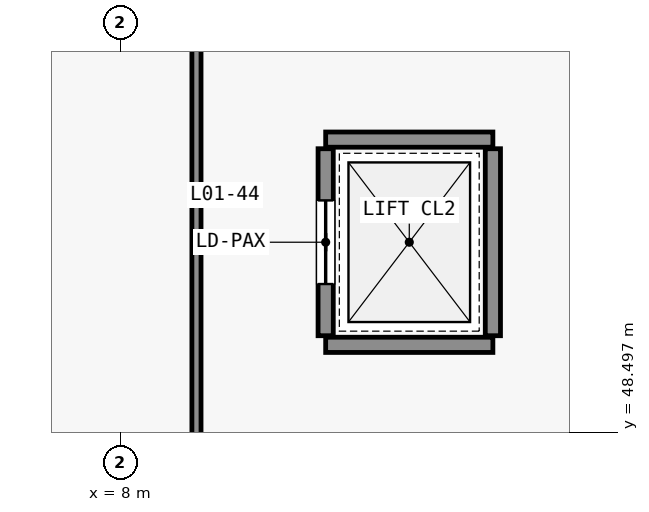
"""IFC4 building model, lengths in metres.
Left out: names, types, materials, properties, quantities, classifications, styles, units other than length and angle.
Written with IfcOpenShell. Run it as: python <this file> out.ifc"""

import sys

from ifc_helpers import new_model, si_unit, direction, frame, frame_2d, origin, place, context, subcontext, project, spatial, rectangle, extrude, element, fill, save


model = new_model("IFC4")
c1 = context("Model", 3, precision=1e-05, world=origin(), true_north=direction((0.0, 1.0)))
c2 = subcontext(c1, "Body", "Model", "MODEL_VIEW")
j1 = project(units=[si_unit("LENGTHUNIT", "METRE"), si_unit("PLANEANGLEUNIT", "RADIAN")], contexts=[c1])
p1 = place(None, origin())
s1 = spatial("IfcSite", under=j1, at=p1, CompositionType="ELEMENT")
p2 = place(p1, origin())
s2 = spatial("IfcBuilding", under=s1, at=p2, CompositionType="ELEMENT")
p3 = place(p2, frame((0.0, 0.0, 6.0)))
s3 = spatial("IfcBuildingStorey", under=s2, at=p3, CompositionType="ELEMENT", Elevation=6.0)
for number, where, z_axis, x_axis in (
    (1, (10.7, 49.65, 0.0), (0.0, 0.0, 1.0), (1.0, 0.0, 0.0)),
    (2, (10.7, 52.35, 0.0), (0.0, 0.0, 1.0), (1.0, 0.0, 0.0)),
):
    element("IfcWall", number, at=place(p3, frame(where, z_axis=z_axis, x_axis=x_axis)), inside=s3, PredefinedType="STANDARD", context=c2, shape_type="SweptSolid", body=[
        extrude(rectangle(XDim=2.2, YDim=0.2, at=frame_2d((1.1, 0.0))), origin(), (0.0, 0.0, 1.0), 5.04),
    ])
p4 = place(p3, frame((10.7, 49.77, 0.0), z_axis=(0.0, 0.0, 1.0), x_axis=(0.0, 1.0, 0.0)))
e3 = element("IfcWall", 3, at=p4, inside=s3, PredefinedType="STANDARD", context=c2, shape_type="SweptSolid", body=[
    extrude(rectangle(XDim=2.46, YDim=0.2, at=frame_2d((1.23, 0.0))), origin(), (0.0, 0.0, 1.0), 5.04),
])
p5 = place(p4, frame((0.68, 0.0, 0.0)))
e4 = element("IfcOpeningElement", 4, at=p5, cuts=e3, PredefinedType="OPENING", context=c2, shape_type="SweptSolid", body=[
    extrude(rectangle(XDim=1.1, YDim=2.15, at=frame_2d((0.55, 1.075))), frame((0.0, 0.11, 0.0), z_axis=(0.0, -1.0, 0.0), x_axis=(1.0, 0.0, 0.0)), (0.0, 0.0, 1.0), 0.22),
])
p6 = place(p3, frame((12.9, 49.77, 0.0), z_axis=(0.0, 0.0, 1.0), x_axis=(0.0, 1.0, 0.0)))
e5 = element("IfcWall", 5, at=p6, inside=s3, PredefinedType="STANDARD", context=c2, shape_type="SweptSolid", body=[
    extrude(rectangle(XDim=2.46, YDim=0.2, at=frame_2d((1.23, 0.0))), origin(), (0.0, 0.0, 1.0), 5.04),
])
p7 = place(p3, frame((9.0, 33.62, 0.0), z_axis=(0.0, 0.0, 1.0), x_axis=(0.0, 1.0, 0.0)))
e6 = element("IfcWall", 6, at=p7, inside=s3, PredefinedType="PARTITIONING", context=c2, shape_type="SweptSolid", body=[
    extrude(rectangle(XDim=22.76, YDim=0.12, at=frame_2d((11.38, 0.0))), origin(), (0.0, 0.0, 1.0), 4.29),
])
p8 = place(p7, frame((9.38, 0.0, 0.0)))
e7 = element("IfcOpeningElement", 7, at=p8, cuts=e6, PredefinedType="OPENING", context=c2, shape_type="SweptSolid", body=[
    extrude(rectangle(XDim=1.6, YDim=2.25, at=frame_2d((0.8, 1.125))), frame((0.0, 0.07, 0.0), z_axis=(0.0, -1.0, 0.0), x_axis=(1.0, 0.0, 0.0)), (0.0, 0.0, 1.0), 0.14),
])
p9 = place(p5, origin())
e8 = element("IfcDoor", 8, at=p9, inside=s3, OperationType="SLIDING_TO_LEFT", PredefinedType="DOOR", context=c2, shape_type="SweptSolid", body=[
    extrude(rectangle(XDim=1.1, YDim=2.15, at=frame_2d((0.55, 1.075))), frame((0.0, 0.025, 0.0), z_axis=(0.0, -1.0, 0.0), x_axis=(1.0, 0.0, 0.0)), (0.0, 0.0, 1.0), 0.05),
])
fill(e4, e8)
save(model, sys.argv[1])
